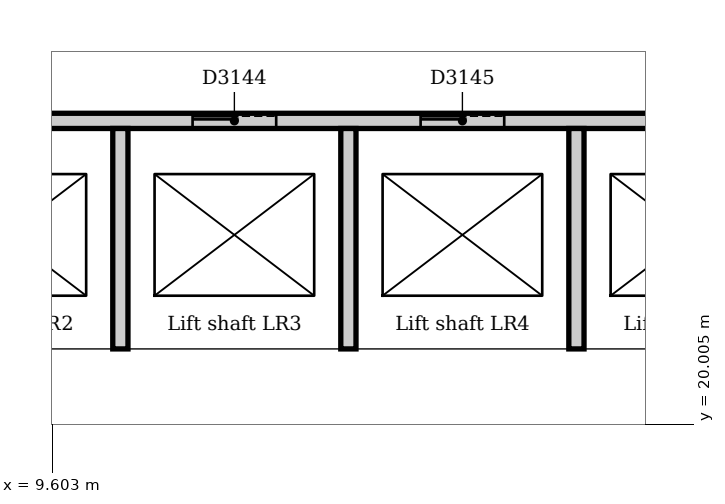
"""IFC4 building model, lengths in metres.
Left out: names, types, materials, properties, quantities, classifications, styles, units other than length and angle.
Written with IfcOpenShell. Run it as: python <this file> out.ifc"""

import sys

from ifc_helpers import new_model, si_unit, direction, frame, frame_2d, origin, place, context, subcontext, project, spatial, rectangle, extrude, element, fill, save


model = new_model("IFC4")
c1 = context("Model", 3, precision=1e-05, world=origin(), true_north=direction((0.0, 1.0)))
c2 = subcontext(c1, "Body", "Model", "MODEL_VIEW")
j1 = project(units=[si_unit("LENGTHUNIT", "METRE"), si_unit("PLANEANGLEUNIT", "RADIAN")], contexts=[c1])
p1 = place(None, origin())
s1 = spatial("IfcSite", under=j1, at=p1, CompositionType="ELEMENT")
p2 = place(p1, origin())
s2 = spatial("IfcBuilding", under=s1, at=p2, CompositionType="ELEMENT")
p3 = place(p2, frame((0.0, 0.0, 16.0)))
s3 = spatial("IfcBuildingStorey", under=s2, at=p3, CompositionType="ELEMENT", Elevation=16.0)
p4 = place(p3, frame((3.9, 20.4, 0.0), z_axis=(0.0, 0.0, 1.0), x_axis=(1.0, 0.0, 0.0)))
e1 = element("IfcWall", 1, at=p4, inside=s3, PredefinedType="SOLIDWALL", context=c2, shape_type="SweptSolid", body=[
    extrude(rectangle(XDim=19.8, YDim=1.2, at=frame_2d((9.9, 0.0))), origin(), (0.0, 0.0, 1.0), 5.0),
])
p5 = place(p3, frame((4.5, 24.0, 0.0), z_axis=(0.0, 0.0, 1.0), x_axis=(1.0, 0.0, 0.0)))
e2 = element("IfcWall", 2, at=p5, inside=s3, PredefinedType="PARTITIONING", context=c2, shape_type="SweptSolid", body=[
    extrude(rectangle(XDim=18.0, YDim=0.2, at=frame_2d((9.0, 0.0))), origin(), (0.0, 0.0, 1.0), 4.7),
])
p6 = place(p5, frame((0.95, 0.0, 0.0)))
e3 = element("IfcOpeningElement", 3, at=p6, cuts=e2, PredefinedType="OPENING", context=c2, shape_type="SweptSolid", body=[
    extrude(rectangle(XDim=1.1, YDim=2.1, at=frame_2d((0.55, 1.05))), frame((0.0, 0.11, 0.0), z_axis=(0.0, -1.0, 0.0), x_axis=(1.0, 0.0, 0.0)), (0.0, 0.0, 1.0), 0.22),
])
p7 = place(p5, frame((3.95, 0.0, 0.0)))
e4 = element("IfcOpeningElement", 4, at=p7, cuts=e2, PredefinedType="OPENING", context=c2, shape_type="SweptSolid", body=[
    extrude(rectangle(XDim=1.1, YDim=2.1, at=frame_2d((0.55, 1.05))), frame((0.0, 0.11, 0.0), z_axis=(0.0, -1.0, 0.0), x_axis=(1.0, 0.0, 0.0)), (0.0, 0.0, 1.0), 0.22),
])
p8 = place(p5, frame((6.95, 0.0, 0.0)))
e5 = element("IfcOpeningElement", 5, at=p8, cuts=e2, PredefinedType="OPENING", context=c2, shape_type="SweptSolid", body=[
    extrude(rectangle(XDim=1.1, YDim=2.1, at=frame_2d((0.55, 1.05))), frame((0.0, 0.11, 0.0), z_axis=(0.0, -1.0, 0.0), x_axis=(1.0, 0.0, 0.0)), (0.0, 0.0, 1.0), 0.22),
])
p9 = place(p5, frame((9.95, 0.0, 0.0)))
e6 = element("IfcOpeningElement", 6, at=p9, cuts=e2, PredefinedType="OPENING", context=c2, shape_type="SweptSolid", body=[
    extrude(rectangle(XDim=1.1, YDim=2.1, at=frame_2d((0.55, 1.05))), frame((0.0, 0.11, 0.0), z_axis=(0.0, -1.0, 0.0), x_axis=(1.0, 0.0, 0.0)), (0.0, 0.0, 1.0), 0.22),
])
p10 = place(p5, frame((12.95, 0.0, 0.0)))
e7 = element("IfcOpeningElement", 7, at=p10, cuts=e2, PredefinedType="OPENING", context=c2, shape_type="SweptSolid", body=[
    extrude(rectangle(XDim=1.1, YDim=2.1, at=frame_2d((0.55, 1.05))), frame((0.0, 0.11, 0.0), z_axis=(0.0, -1.0, 0.0), x_axis=(1.0, 0.0, 0.0)), (0.0, 0.0, 1.0), 0.22),
])
p11 = place(p5, frame((15.95, 0.0, 0.0)))
e8 = element("IfcOpeningElement", 8, at=p11, cuts=e2, PredefinedType="OPENING", context=c2, shape_type="SweptSolid", body=[
    extrude(rectangle(XDim=1.1, YDim=2.1, at=frame_2d((0.55, 1.05))), frame((0.0, 0.11, 0.0), z_axis=(0.0, -1.0, 0.0), x_axis=(1.0, 0.0, 0.0)), (0.0, 0.0, 1.0), 0.22),
])
for number, where, z_axis, x_axis in (
    (9, (10.5, 21.0, 0.0), (0.0, 0.0, 1.0), (0.0, 1.0, 0.0)),
    (10, (13.5, 21.0, 0.0), (0.0, 0.0, 1.0), (0.0, 1.0, 0.0)),
    (11, (16.5, 21.0, 0.0), (0.0, 0.0, 1.0), (0.0, 1.0, 0.0)),
):
    element("IfcWall", number, at=place(p3, frame(where, z_axis=z_axis, x_axis=x_axis)), inside=s3, PredefinedType="PARTITIONING", context=c2, shape_type="SweptSolid", body=[
        extrude(rectangle(XDim=2.9, YDim=0.2, at=frame_2d((1.45, 0.0))), origin(), (0.0, 0.0, 1.0), 4.7),
    ])
p12 = place(p8, origin())
e12 = element("IfcDoor", 12, at=p12, inside=s3, OperationType="SLIDING_TO_LEFT", PredefinedType="DOOR", context=c2, shape_type="SweptSolid", body=[
    extrude(rectangle(XDim=1.1, YDim=2.1, at=frame_2d((0.55, 1.05))), frame((0.0, 0.025, 0.0), z_axis=(0.0, -1.0, 0.0), x_axis=(1.0, 0.0, 0.0)), (0.0, 0.0, 1.0), 0.05),
])
fill(e5, e12)
p13 = place(p9, origin())
e13 = element("IfcDoor", 13, at=p13, inside=s3, OperationType="SLIDING_TO_LEFT", PredefinedType="DOOR", context=c2, shape_type="SweptSolid", body=[
    extrude(rectangle(XDim=1.1, YDim=2.1, at=frame_2d((0.55, 1.05))), frame((0.0, 0.025, 0.0), z_axis=(0.0, -1.0, 0.0), x_axis=(1.0, 0.0, 0.0)), (0.0, 0.0, 1.0), 0.05),
])
fill(e6, e13)
save(model, sys.argv[1])
